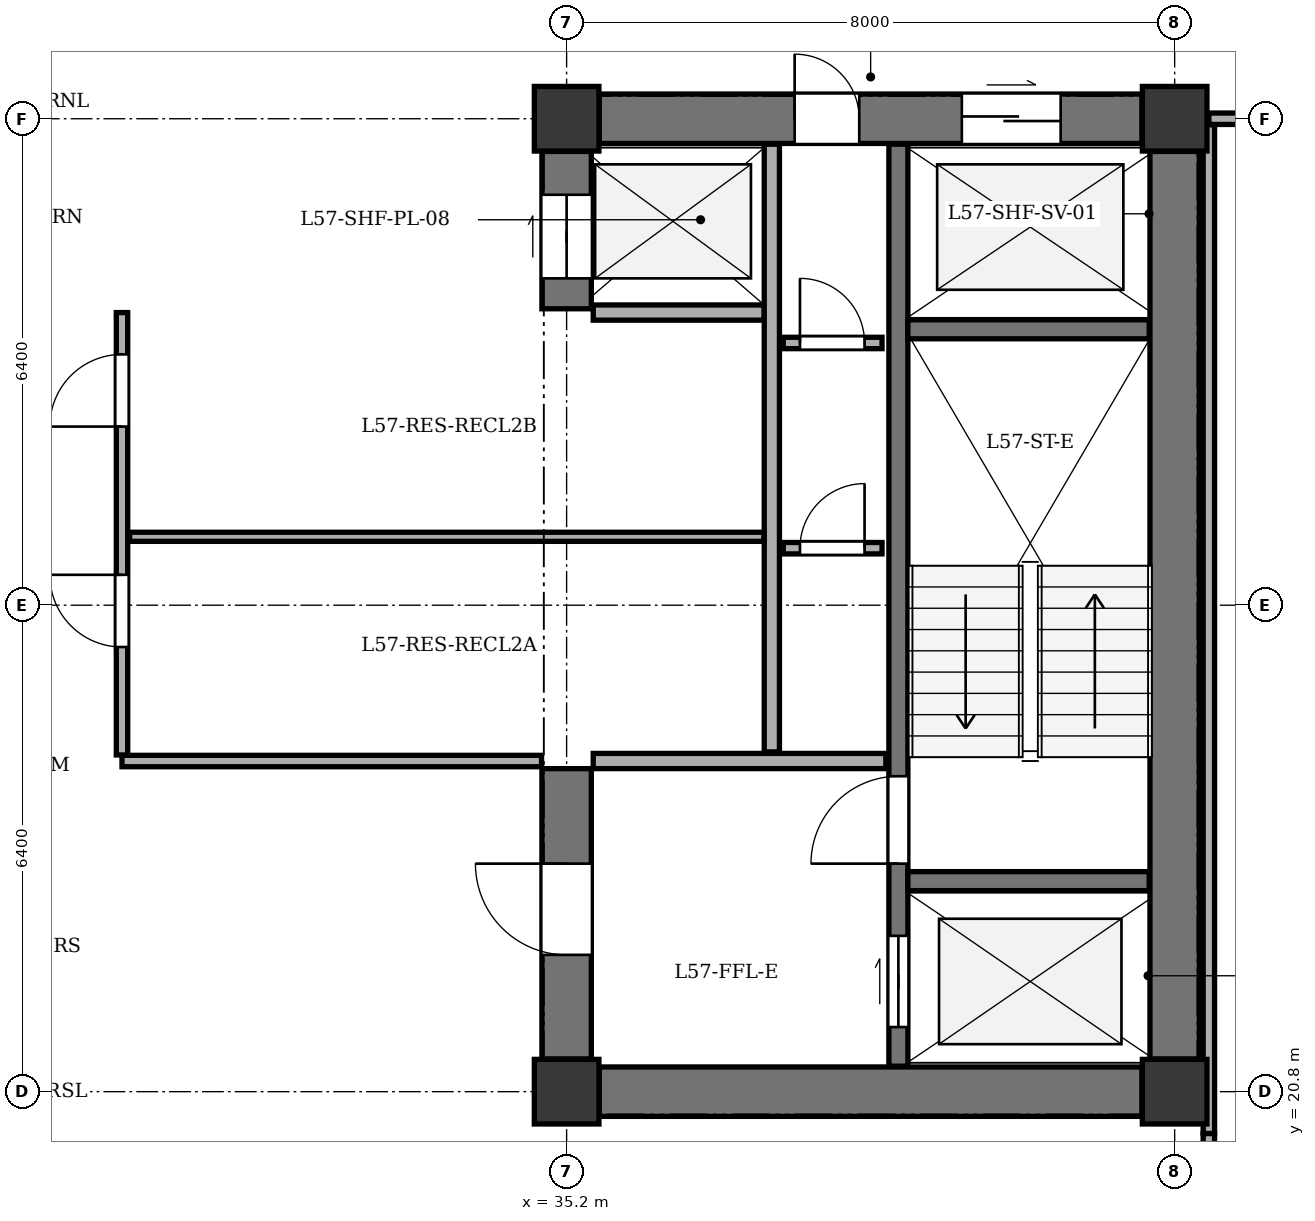
"""IFC4 building model, lengths in metres.
Left out: names, types, materials, properties, quantities, classifications, styles, units other than length and angle.
Written with IfcOpenShell. Run it as: python <this file> out.ifc"""

import sys

from ifc_helpers import new_model, si_unit, direction, frame, frame_2d, origin, origin_2d, place, context, subcontext, project, spatial, rectangle, extrude, element, fill, save


model = new_model("IFC4")
c1 = context("Model", 3, precision=1e-05, world=origin(), true_north=direction((0.0, 1.0)))
c2 = subcontext(c1, "Body", "Model", "MODEL_VIEW")
j1 = project(units=[si_unit("LENGTHUNIT", "METRE"), si_unit("PLANEANGLEUNIT", "RADIAN")], contexts=[c1])
p1 = place(None, origin())
s1 = spatial("IfcSite", under=j1, at=p1, CompositionType="ELEMENT")
p2 = place(p1, origin())
s2 = spatial("IfcBuilding", under=s1, at=p2, CompositionType="ELEMENT")
p3 = place(p2, frame((0.0, 0.0, 221.1)))
s3 = spatial("IfcBuildingStorey", under=s2, at=p3, CompositionType="ELEMENT", Elevation=221.1)
for number, where, z_axis, x_axis in (
    (1, (35.2, 20.8, 0.0), (0.0, 0.0, 1.0), (1.0, 0.0, 0.0)),
    (2, (43.2, 20.8, 0.0), (0.0, 0.0, 1.0), (1.0, 0.0, 0.0)),
    (3, (35.2, 33.6, 0.0), (0.0, 0.0, 1.0), (1.0, 0.0, 0.0)),
    (4, (43.2, 33.6, 0.0), (0.0, 0.0, 1.0), (1.0, 0.0, 0.0)),
):
    element("IfcColumn", number, at=place(p3, frame(where, z_axis=z_axis, x_axis=x_axis)), inside=s3, PredefinedType="COLUMN", context=c2, shape_type="SweptSolid", body=[
        extrude(rectangle(XDim=0.85, YDim=0.85, at=origin_2d()), origin(), (0.0, 0.0, 1.0), 3.4),
    ])
p4 = place(p3, frame((43.2, 21.23, 0.0), z_axis=(0.0, 0.0, 1.0), x_axis=(0.0, 1.0, 0.0)))
e5 = element("IfcWall", 5, at=p4, inside=s3, PredefinedType="SHEAR", context=c2, shape_type="SweptSolid", body=[
    extrude(rectangle(XDim=11.94, YDim=0.65, at=frame_2d((5.97, 0.0))), origin(), (0.0, 0.0, 1.0), 3.1),
])
p5 = place(p3, frame((35.63, 20.8, 0.0), z_axis=(0.0, 0.0, 1.0), x_axis=(1.0, 0.0, 0.0)))
e6 = element("IfcWall", 6, at=p5, inside=s3, PredefinedType="SHEAR", context=c2, shape_type="SweptSolid", body=[
    extrude(rectangle(XDim=7.14, YDim=0.65, at=frame_2d((3.57, 0.0))), origin(), (0.0, 0.0, 1.0), 3.1),
])
p6 = place(p3, frame((35.63, 33.6, 0.0), z_axis=(0.0, 0.0, 1.0), x_axis=(1.0, 0.0, 0.0)))
e7 = element("IfcWall", 7, at=p6, inside=s3, PredefinedType="SHEAR", context=c2, shape_type="SweptSolid", body=[
    extrude(rectangle(XDim=7.14, YDim=0.65, at=frame_2d((3.57, 0.0))), origin(), (0.0, 0.0, 1.0), 3.1),
])
p7 = place(p6, frame((4.77, 0.0, 0.0)))
e8 = element("IfcOpeningElement", 8, at=p7, cuts=e7, PredefinedType="OPENING", context=c2, shape_type="SweptSolid", body=[
    extrude(rectangle(XDim=1.3, YDim=2.15, at=frame_2d((0.65, 1.075))), frame((0.0, 0.335, 0.0), z_axis=(0.0, -1.0, 0.0), x_axis=(1.0, 0.0, 0.0)), (0.0, 0.0, 1.0), 0.67),
])
p8 = place(p6, frame((2.57, 0.0, 0.0)))
e9 = element("IfcOpeningElement", 9, at=p8, cuts=e7, PredefinedType="OPENING", context=c2, shape_type="SweptSolid", body=[
    extrude(rectangle(XDim=0.85, YDim=2.02, at=frame_2d((0.425, 1.01))), frame((0.0, 0.335, 0.0), z_axis=(0.0, -1.0, 0.0), x_axis=(1.0, 0.0, 0.0)), (0.0, 0.0, 1.0), 0.67),
])
p9 = place(p3, frame((35.2, 21.23, 0.0), z_axis=(0.0, 0.0, 1.0), x_axis=(0.0, 1.0, 0.0)))
e10 = element("IfcWall", 10, at=p9, inside=s3, PredefinedType="SHEAR", context=c2, shape_type="SweptSolid", body=[
    extrude(rectangle(XDim=3.82, YDim=0.65, at=frame_2d((1.91, 0.0))), origin(), (0.0, 0.0, 1.0), 3.1),
])
p10 = place(p9, frame((1.37, 0.0, 0.0)))
e11 = element("IfcOpeningElement", 11, at=p10, cuts=e10, PredefinedType="OPENING", context=c2, shape_type="SweptSolid", body=[
    extrude(rectangle(XDim=1.2, YDim=2.15, at=frame_2d((0.6, 1.075))), frame((0.0, 0.335, 0.0), z_axis=(0.0, -1.0, 0.0), x_axis=(1.0, 0.0, 0.0)), (0.0, 0.0, 1.0), 0.67),
])
p11 = place(p3, frame((35.2, 31.1, 0.0), z_axis=(0.0, 0.0, 1.0), x_axis=(0.0, 1.0, 0.0)))
e12 = element("IfcWall", 12, at=p11, inside=s3, PredefinedType="SHEAR", context=c2, shape_type="SweptSolid", body=[
    extrude(rectangle(XDim=2.07, YDim=0.65, at=frame_2d((1.035, 0.0))), origin(), (0.0, 0.0, 1.0), 3.1),
])
p12 = place(p11, frame((0.4, 0.0, 0.0)))
e13 = element("IfcOpeningElement", 13, at=p12, cuts=e12, PredefinedType="OPENING", context=c2, shape_type="SweptSolid", body=[
    extrude(rectangle(XDim=1.1, YDim=2.1, at=frame_2d((0.55, 1.05))), frame((0.0, 0.335, 0.0), z_axis=(0.0, -1.0, 0.0), x_axis=(1.0, 0.0, 0.0)), (0.0, 0.0, 1.0), 0.67),
])
p13 = place(p3, frame((39.565, 21.135, 0.0), z_axis=(0.0, 0.0, 1.0), x_axis=(0.0, 1.0, 0.0)))
e14 = element("IfcWall", 14, at=p13, inside=s3, PredefinedType="SHEAR", context=c2, shape_type="SweptSolid", body=[
    extrude(rectangle(XDim=12.13, YDim=0.25, at=frame_2d((6.065, 0.0))), origin(), (0.0, 0.0, 1.0), 3.1),
])
p14 = place(p13, frame((0.515, 0.0, 0.0)))
e15 = element("IfcOpeningElement", 15, at=p14, cuts=e14, PredefinedType="OPENING", context=c2, shape_type="SweptSolid", body=[
    extrude(rectangle(XDim=1.2, YDim=2.15, at=frame_2d((0.6, 1.075))), frame((0.0, 0.135, 0.0), z_axis=(0.0, -1.0, 0.0), x_axis=(1.0, 0.0, 0.0)), (0.0, 0.0, 1.0), 0.27),
])
p15 = place(p13, frame((2.665, 0.0, 0.0)))
e16 = element("IfcOpeningElement", 16, at=p15, cuts=e14, PredefinedType="OPENING", context=c2, shape_type="SweptSolid", body=[
    extrude(rectangle(XDim=1.15, YDim=2.15, at=frame_2d((0.575, 1.075))), frame((0.0, 0.135, 0.0), z_axis=(0.0, -1.0, 0.0), x_axis=(1.0, 0.0, 0.0)), (0.0, 0.0, 1.0), 0.27),
])
for number, where, z_axis, x_axis in (
    (17, (39.69, 23.57, 0.0), (0.0, 0.0, 1.0), (1.0, 0.0, 0.0)),
    (18, (39.69, 30.83, 0.0), (0.0, 0.0, 1.0), (1.0, 0.0, 0.0)),
):
    element("IfcWall", number, at=place(p3, frame(where, z_axis=z_axis, x_axis=x_axis)), inside=s3, PredefinedType="SHEAR", context=c2, shape_type="SweptSolid", body=[
        extrude(rectangle(XDim=3.175, YDim=0.25, at=frame_2d((1.587, 0.0))), origin(), (0.0, 0.0, 1.0), 3.1),
    ])
p16 = place(p3, frame((35.55, 25.15, 0.0), z_axis=(0.0, 0.0, 1.0), x_axis=(1.0, 0.0, 0.0)))
e19 = element("IfcWall", 19, at=p16, inside=s3, PredefinedType="SOLIDWALL", context=c2, shape_type="SweptSolid", body=[
    extrude(rectangle(XDim=3.85, YDim=0.2, at=frame_2d((1.925, 0.0))), origin(), (0.0, 0.0, 1.0), 3.1),
])
p17 = place(p3, frame((35.55, 31.05, 0.0), z_axis=(0.0, 0.0, 1.0), x_axis=(1.0, 0.0, 0.0)))
e20 = element("IfcWall", 20, at=p17, inside=s3, PredefinedType="SOLIDWALL", context=c2, shape_type="SweptSolid", body=[
    extrude(rectangle(XDim=2.25, YDim=0.2, at=frame_2d((1.125, 0.0))), origin(), (0.0, 0.0, 1.0), 3.1),
])
p18 = place(p3, frame((37.9, 25.27, 0.0), z_axis=(0.0, 0.0, 1.0), x_axis=(0.0, 1.0, 0.0)))
e21 = element("IfcWall", 21, at=p18, inside=s3, PredefinedType="SOLIDWALL", context=c2, shape_type="SweptSolid", body=[
    extrude(rectangle(XDim=7.995, YDim=0.2, at=frame_2d((3.998, 0.0))), origin(), (0.0, 0.0, 1.0), 3.1),
])
p19 = place(p3, frame((38.05, 27.95, 0.0), z_axis=(0.0, 0.0, 1.0), x_axis=(1.0, 0.0, 0.0)))
e22 = element("IfcWall", 22, at=p19, inside=s3, PredefinedType="PARTITIONING", context=c2, shape_type="SweptSolid", body=[
    extrude(rectangle(XDim=1.3, YDim=0.15, at=frame_2d((0.65, 0.0))), origin(), (0.0, 0.0, 1.0), 3.1),
])
p20 = place(p19, frame((0.22, 0.0, 0.0)))
e23 = element("IfcOpeningElement", 23, at=p20, cuts=e22, PredefinedType="OPENING", context=c2, shape_type="SweptSolid", body=[
    extrude(rectangle(XDim=0.85, YDim=2.02, at=frame_2d((0.425, 1.01))), frame((0.0, 0.085, 0.0), z_axis=(0.0, -1.0, 0.0), x_axis=(1.0, 0.0, 0.0)), (0.0, 0.0, 1.0), 0.17),
])
p21 = place(p3, frame((38.05, 30.65, 0.0), z_axis=(0.0, 0.0, 1.0), x_axis=(1.0, 0.0, 0.0)))
e24 = element("IfcWall", 24, at=p21, inside=s3, PredefinedType="PARTITIONING", context=c2, shape_type="SweptSolid", body=[
    extrude(rectangle(XDim=1.3, YDim=0.15, at=frame_2d((0.65, 0.0))), origin(), (0.0, 0.0, 1.0), 3.1),
])
p22 = place(p21, frame((0.22, 0.0, 0.0)))
e25 = element("IfcOpeningElement", 25, at=p22, cuts=e24, PredefinedType="OPENING", context=c2, shape_type="SweptSolid", body=[
    extrude(rectangle(XDim=0.85, YDim=2.02, at=frame_2d((0.425, 1.01))), frame((0.0, 0.085, 0.0), z_axis=(0.0, -1.0, 0.0), x_axis=(1.0, 0.0, 0.0)), (0.0, 0.0, 1.0), 0.17),
])
p23 = place(p3, frame((29.35, 25.15, 0.0), z_axis=(0.0, 0.0, 1.0), x_axis=(1.0, 0.0, 0.0)))
e26 = element("IfcWall", 26, at=p23, inside=s3, PredefinedType="PARTITIONING", context=c2, shape_type="SweptSolid", body=[
    extrude(rectangle(XDim=5.52, YDim=0.15, at=frame_2d((2.76, 0.0))), origin(), (0.0, 0.0, 1.0), 3.1),
])
p24 = place(p3, frame((29.35, 25.23, 0.0), z_axis=(0.0, 0.0, 1.0), x_axis=(0.0, 1.0, 0.0)))
e27 = element("IfcWall", 27, at=p24, inside=s3, PredefinedType="PARTITIONING", context=c2, shape_type="SweptSolid", body=[
    extrude(rectangle(XDim=5.82, YDim=0.15, at=frame_2d((2.91, 0.0))), origin(), (0.0, 0.0, 1.0), 3.1),
])
p25 = place(p24, frame((1.42, 0.0, 0.0)))
e28 = element("IfcOpeningElement", 28, at=p25, cuts=e27, PredefinedType="OPENING", context=c2, shape_type="SweptSolid", body=[
    extrude(rectangle(XDim=0.95, YDim=2.1, at=frame_2d((0.475, 1.05))), frame((0.0, 0.085, 0.0), z_axis=(0.0, -1.0, 0.0), x_axis=(1.0, 0.0, 0.0)), (0.0, 0.0, 1.0), 0.17),
])
p26 = place(p24, frame((4.32, 0.0, 0.0)))
e29 = element("IfcOpeningElement", 29, at=p26, cuts=e27, PredefinedType="OPENING", context=c2, shape_type="SweptSolid", body=[
    extrude(rectangle(XDim=0.95, YDim=2.1, at=frame_2d((0.475, 1.05))), frame((0.0, 0.085, 0.0), z_axis=(0.0, -1.0, 0.0), x_axis=(1.0, 0.0, 0.0)), (0.0, 0.0, 1.0), 0.17),
])
p27 = place(p3, frame((29.45, 28.1, 0.0), z_axis=(0.0, 0.0, 1.0), x_axis=(1.0, 0.0, 0.0)))
e30 = element("IfcWall", 30, at=p27, inside=s3, PredefinedType="PARTITIONING", context=c2, shape_type="SweptSolid", body=[
    extrude(rectangle(XDim=8.345, YDim=0.12, at=frame_2d((4.172, 0.0))), origin(), (0.0, 0.0, 1.0), 3.1),
])
p28 = place(p3, frame((43.65, 33.6, 0.0), z_axis=(0.0, 0.0, 1.0), x_axis=(1.0, 0.0, 0.0)))
e31 = element("IfcWall", 31, at=p28, inside=s3, PredefinedType="PARTITIONING", context=c2, shape_type="SweptSolid", body=[
    extrude(rectangle(XDim=5.305, YDim=0.15, at=frame_2d((2.653, 0.0))), origin(), (0.0, 0.0, 1.0), 2.535),
])
p29 = place(p3, frame((43.65, 18.46, 0.0), z_axis=(0.0, 0.0, 1.0), x_axis=(0.0, 1.0, 0.0)))
e32 = element("IfcWall", 32, at=p29, inside=s3, PredefinedType="PARTITIONING", context=c2, shape_type="SweptSolid", body=[
    extrude(rectangle(XDim=1.79, YDim=0.15, at=frame_2d((0.895, 0.0))), origin(), (0.0, 0.0, 1.0), 3.1),
])
p30 = place(p29, frame((0.38, 0.0, 0.0)))
e33 = element("IfcOpeningElement", 33, at=p30, cuts=e32, PredefinedType="OPENING", context=c2, shape_type="SweptSolid", body=[
    extrude(rectangle(XDim=0.95, YDim=2.1, at=frame_2d((0.475, 1.05))), frame((0.0, 0.085, 0.0), z_axis=(0.0, -1.0, 0.0), x_axis=(1.0, 0.0, 0.0)), (0.0, 0.0, 1.0), 0.17),
])
p31 = place(p3, frame((43.65, 20.25, 0.0), z_axis=(0.0, 0.0, 1.0), x_axis=(0.0, 1.0, 0.0)))
e34 = element("IfcWall", 34, at=p31, inside=s3, PredefinedType="PARTITIONING", context=c2, shape_type="SweptSolid", body=[
    extrude(rectangle(XDim=13.27, YDim=0.15, at=frame_2d((6.635, 0.0))), origin(), (0.0, 0.0, 1.0), 3.1),
])
p32 = place(p7, origin())
e35 = element("IfcDoor", 35, at=p32, inside=s3, OperationType="DOUBLE_DOOR_SLIDING", PredefinedType="DOOR", context=c2, shape_type="SweptSolid", body=[
    extrude(rectangle(XDim=1.3, YDim=2.15, at=frame_2d((0.65, 1.075))), frame((0.0, 0.025, 0.0), z_axis=(0.0, -1.0, 0.0), x_axis=(1.0, 0.0, 0.0)), (0.0, 0.0, 1.0), 0.05),
])
fill(e8, e35)
p33 = place(p8, origin())
e36 = element("IfcDoor", 36, at=p33, inside=s3, OperationType="SINGLE_SWING_LEFT", PredefinedType="DOOR", context=c2, shape_type="SweptSolid", body=[
    extrude(rectangle(XDim=0.85, YDim=2.02, at=frame_2d((0.425, 1.01))), frame((0.0, 0.025, 0.0), z_axis=(0.0, -1.0, 0.0), x_axis=(1.0, 0.0, 0.0)), (0.0, 0.0, 1.0), 0.05),
])
fill(e9, e36)
p34 = place(p10, origin())
e37 = element("IfcDoor", 37, at=p34, inside=s3, OperationType="SINGLE_SWING_RIGHT", PredefinedType="DOOR", context=c2, shape_type="SweptSolid", body=[
    extrude(rectangle(XDim=1.2, YDim=2.15, at=frame_2d((0.6, 1.075))), frame((0.0, 0.025, 0.0), z_axis=(0.0, -1.0, 0.0), x_axis=(1.0, 0.0, 0.0)), (0.0, 0.0, 1.0), 0.05),
])
fill(e11, e37)
p35 = place(p12, origin())
e38 = element("IfcDoor", 38, at=p35, inside=s3, OperationType="DOUBLE_DOOR_SLIDING", PredefinedType="DOOR", context=c2, shape_type="SweptSolid", body=[
    extrude(rectangle(XDim=1.1, YDim=2.1, at=frame_2d((0.55, 1.05))), frame((0.0, 0.025, 0.0), z_axis=(0.0, -1.0, 0.0), x_axis=(1.0, 0.0, 0.0)), (0.0, 0.0, 1.0), 0.05),
])
fill(e13, e38)
p36 = place(p14, origin())
e39 = element("IfcDoor", 39, at=p36, inside=s3, OperationType="DOUBLE_DOOR_SLIDING", PredefinedType="DOOR", context=c2, shape_type="SweptSolid", body=[
    extrude(rectangle(XDim=1.2, YDim=2.15, at=frame_2d((0.6, 1.075))), frame((0.0, 0.025, 0.0), z_axis=(0.0, -1.0, 0.0), x_axis=(1.0, 0.0, 0.0)), (0.0, 0.0, 1.0), 0.05),
])
fill(e15, e39)
p37 = place(p15, origin())
e40 = element("IfcDoor", 40, at=p37, inside=s3, OperationType="SINGLE_SWING_LEFT", PredefinedType="DOOR", context=c2, shape_type="SweptSolid", body=[
    extrude(rectangle(XDim=1.15, YDim=2.15, at=frame_2d((0.575, 1.075))), frame((0.0, 0.025, 0.0), z_axis=(0.0, -1.0, 0.0), x_axis=(1.0, 0.0, 0.0)), (0.0, 0.0, 1.0), 0.05),
])
fill(e16, e40)
p38 = place(p20, origin())
e41 = element("IfcDoor", 41, at=p38, inside=s3, OperationType="SINGLE_SWING_RIGHT", PredefinedType="DOOR", context=c2, shape_type="SweptSolid", body=[
    extrude(rectangle(XDim=0.85, YDim=2.02, at=frame_2d((0.425, 1.01))), frame((0.0, 0.025, 0.0), z_axis=(0.0, -1.0, 0.0), x_axis=(1.0, 0.0, 0.0)), (0.0, 0.0, 1.0), 0.05),
])
fill(e23, e41)
p39 = place(p22, origin())
e42 = element("IfcDoor", 42, at=p39, inside=s3, OperationType="SINGLE_SWING_LEFT", PredefinedType="DOOR", context=c2, shape_type="SweptSolid", body=[
    extrude(rectangle(XDim=0.85, YDim=2.02, at=frame_2d((0.425, 1.01))), frame((0.0, 0.025, 0.0), z_axis=(0.0, -1.0, 0.0), x_axis=(1.0, 0.0, 0.0)), (0.0, 0.0, 1.0), 0.05),
])
fill(e25, e42)
p40 = place(p25, origin())
e43 = element("IfcDoor", 43, at=p40, inside=s3, OperationType="SINGLE_SWING_RIGHT", PredefinedType="DOOR", context=c2, shape_type="SweptSolid", body=[
    extrude(rectangle(XDim=0.95, YDim=2.1, at=frame_2d((0.475, 1.05))), frame((0.0, 0.025, 0.0), z_axis=(0.0, -1.0, 0.0), x_axis=(1.0, 0.0, 0.0)), (0.0, 0.0, 1.0), 0.05),
])
fill(e28, e43)
p41 = place(p26, origin())
e44 = element("IfcDoor", 44, at=p41, inside=s3, OperationType="SINGLE_SWING_LEFT", PredefinedType="DOOR", context=c2, shape_type="SweptSolid", body=[
    extrude(rectangle(XDim=0.95, YDim=2.1, at=frame_2d((0.475, 1.05))), frame((0.0, 0.025, 0.0), z_axis=(0.0, -1.0, 0.0), x_axis=(1.0, 0.0, 0.0)), (0.0, 0.0, 1.0), 0.05),
])
fill(e29, e44)
save(model, sys.argv[1])
